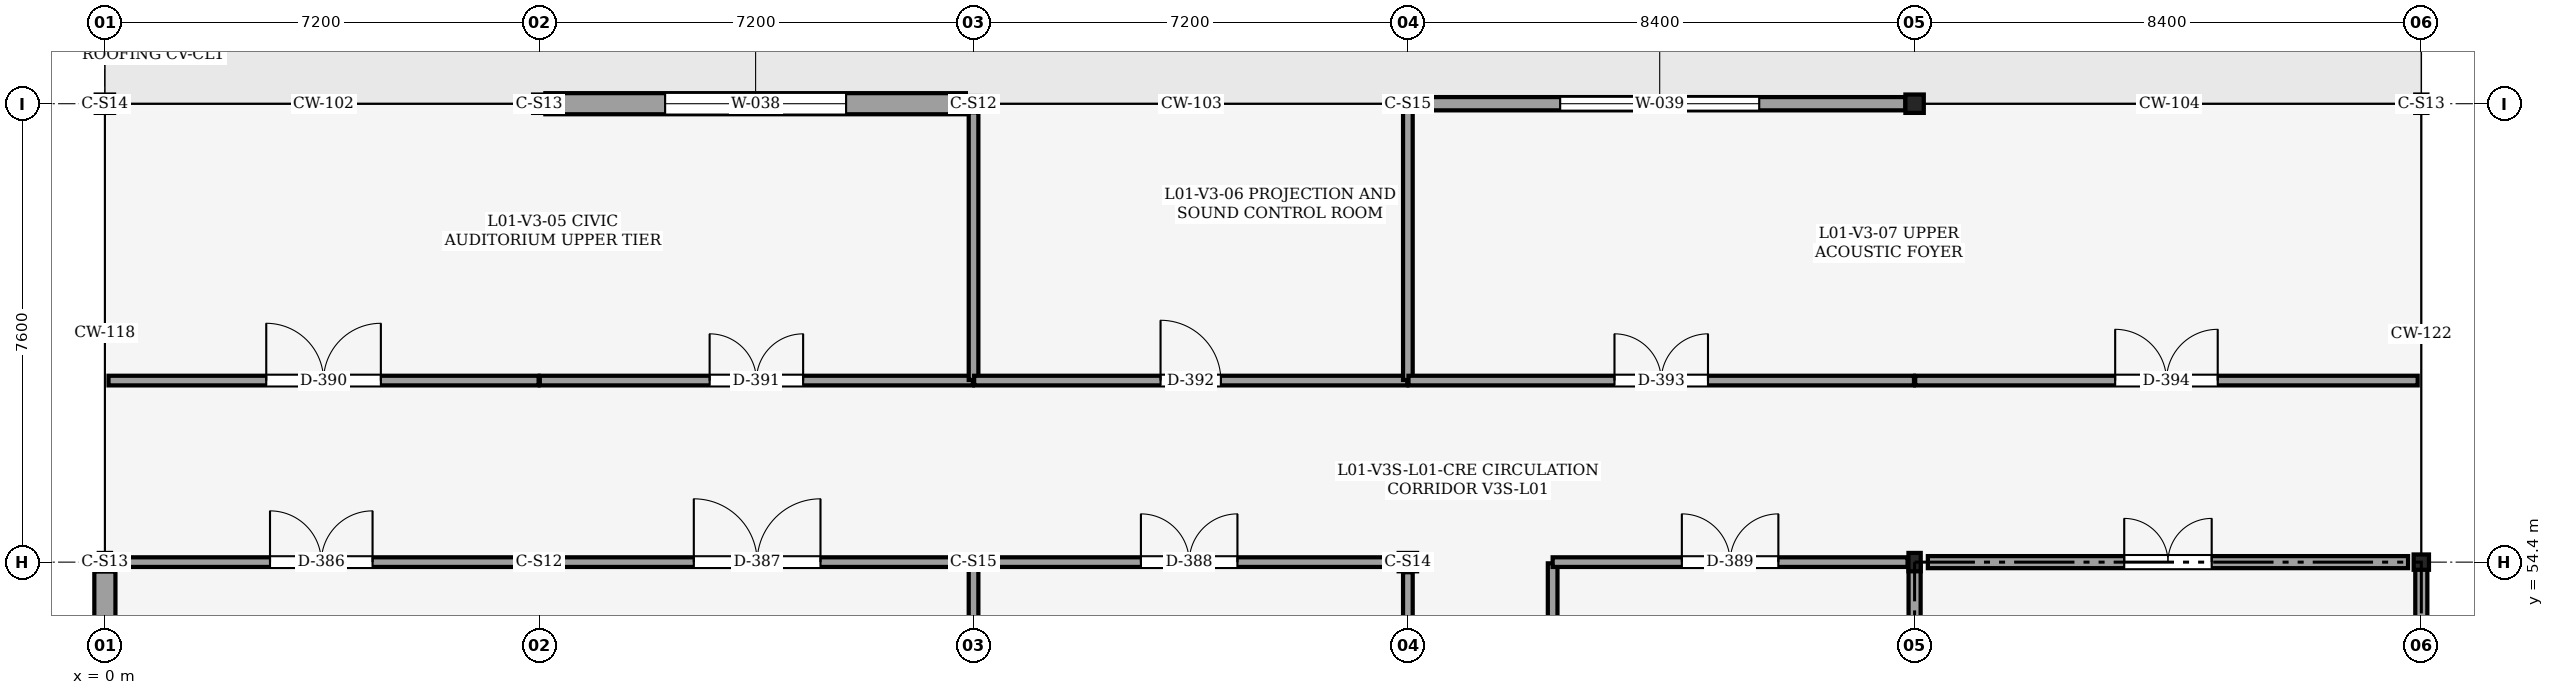
"""IFC4 building model, lengths in metres.
Left out: names, types, materials, properties, quantities, classifications, styles, units other than length and angle.
Written with IfcOpenShell. Run it as: python <this file> out.ifc"""

import sys

from ifc_helpers import new_model, si_unit, direction, frame, frame_2d, origin, origin_2d, place, context, subcontext, project, spatial, rectangle, hollow_rectangle, extrude, element, fill, save


model = new_model("IFC4")
c1 = context("Model", 3, precision=1e-05, world=origin(), true_north=direction((0.0, 1.0)))
c2 = subcontext(c1, "Body", "Model", "MODEL_VIEW")
j1 = project(units=[si_unit("LENGTHUNIT", "METRE"), si_unit("PLANEANGLEUNIT", "RADIAN")], contexts=[c1])
p1 = place(None, origin())
s1 = spatial("IfcSite", under=j1, at=p1, CompositionType="ELEMENT")
p2 = place(p1, origin())
s2 = spatial("IfcBuilding", under=s1, at=p2, CompositionType="ELEMENT")
p3 = place(p2, frame((0.0, 0.0, 5.4)))
s3 = spatial("IfcBuildingStorey", under=s2, at=p3, CompositionType="ELEMENT", Elevation=5.4)
p4 = place(p3, frame((0.0, 54.4, 0.0), z_axis=(0.0, 0.0, 1.0), x_axis=(1.0, 0.0, 0.0)))
e1 = element("IfcColumn", 1, at=p4, inside=s3, PredefinedType="COLUMN", context=c2, shape_type="SweptSolid", body=[
    extrude(hollow_rectangle(XDim=0.203, YDim=0.305, WallThickness=0.013, OuterFilletRadius=0.025, at=origin_2d()), origin(), (0.0, 0.0, 1.0), 4.8),
])
p5 = place(p3, frame((0.0, 62.0, 0.0), z_axis=(0.0, 0.0, 1.0), x_axis=(1.0, 0.0, 0.0)))
e2 = element("IfcColumn", 2, at=p5, inside=s3, PredefinedType="COLUMN", context=c2, shape_type="SweptSolid", body=[
    extrude(hollow_rectangle(XDim=0.305, YDim=0.305, WallThickness=0.016, OuterFilletRadius=0.032, at=origin_2d()), origin(), (0.0, 0.0, 1.0), 4.8),
])
p6 = place(p3, frame((7.2, 54.4, 0.0), z_axis=(0.0, 0.0, 1.0), x_axis=(1.0, 0.0, 0.0)))
e3 = element("IfcColumn", 3, at=p6, inside=s3, PredefinedType="COLUMN", context=c2, shape_type="SweptSolid", body=[
    extrude(hollow_rectangle(XDim=0.254, YDim=0.254, WallThickness=0.013, OuterFilletRadius=0.025, at=origin_2d()), origin(), (0.0, 0.0, 1.0), 4.8),
])
p7 = place(p3, frame((7.2, 62.0, 0.0), z_axis=(0.0, 0.0, 1.0), x_axis=(1.0, 0.0, 0.0)))
e4 = element("IfcColumn", 4, at=p7, inside=s3, PredefinedType="COLUMN", context=c2, shape_type="SweptSolid", body=[
    extrude(hollow_rectangle(XDim=0.203, YDim=0.305, WallThickness=0.013, OuterFilletRadius=0.025, at=origin_2d()), origin(), (0.0, 0.0, 1.0), 4.8),
])
p8 = place(p3, frame((14.4, 54.4, 0.0), z_axis=(0.0, 0.0, 1.0), x_axis=(1.0, 0.0, 0.0)))
e5 = element("IfcColumn", 5, at=p8, inside=s3, PredefinedType="COLUMN", context=c2, shape_type="SweptSolid", body=[
    extrude(hollow_rectangle(XDim=0.203, YDim=0.203, WallThickness=0.013, OuterFilletRadius=0.025, at=origin_2d()), origin(), (0.0, 0.0, 1.0), 4.8),
])
p9 = place(p3, frame((14.4, 62.0, 0.0), z_axis=(0.0, 0.0, 1.0), x_axis=(1.0, 0.0, 0.0)))
e6 = element("IfcColumn", 6, at=p9, inside=s3, PredefinedType="COLUMN", context=c2, shape_type="SweptSolid", body=[
    extrude(hollow_rectangle(XDim=0.254, YDim=0.254, WallThickness=0.013, OuterFilletRadius=0.025, at=origin_2d()), origin(), (0.0, 0.0, 1.0), 4.8),
])
p10 = place(p3, frame((21.6, 54.4, 0.0), z_axis=(0.0, 0.0, 1.0), x_axis=(1.0, 0.0, 0.0)))
e7 = element("IfcColumn", 7, at=p10, inside=s3, PredefinedType="COLUMN", context=c2, shape_type="SweptSolid", body=[
    extrude(hollow_rectangle(XDim=0.305, YDim=0.305, WallThickness=0.016, OuterFilletRadius=0.032, at=origin_2d()), origin(), (0.0, 0.0, 1.0), 4.8),
])
p11 = place(p3, frame((21.6, 62.0, 0.0), z_axis=(0.0, 0.0, 1.0), x_axis=(1.0, 0.0, 0.0)))
e8 = element("IfcColumn", 8, at=p11, inside=s3, PredefinedType="COLUMN", context=c2, shape_type="SweptSolid", body=[
    extrude(hollow_rectangle(XDim=0.203, YDim=0.203, WallThickness=0.013, OuterFilletRadius=0.025, at=origin_2d()), origin(), (0.0, 0.0, 1.0), 4.8),
])
p12 = place(p3, frame((30.0, 54.4, 0.0), z_axis=(0.0, 0.0, 1.0), x_axis=(1.0, 0.0, 0.0)))
e9 = element("IfcColumn", 9, at=p12, inside=s3, PredefinedType="COLUMN", context=c2, shape_type="SweptSolid", body=[
    extrude(hollow_rectangle(XDim=0.203, YDim=0.305, WallThickness=0.013, OuterFilletRadius=0.025, at=origin_2d()), origin(), (0.0, 0.0, 1.0), 4.8),
])
p13 = place(p3, frame((30.0, 62.0, 0.0), z_axis=(0.0, 0.0, 1.0), x_axis=(1.0, 0.0, 0.0)))
e10 = element("IfcColumn", 10, at=p13, inside=s3, PredefinedType="COLUMN", context=c2, shape_type="SweptSolid", body=[
    extrude(hollow_rectangle(XDim=0.305, YDim=0.305, WallThickness=0.016, OuterFilletRadius=0.032, at=origin_2d()), origin(), (0.0, 0.0, 1.0), 4.8),
])
p14 = place(p3, frame((38.4, 54.4, 0.0), z_axis=(0.0, 0.0, 1.0), x_axis=(1.0, 0.0, 0.0)))
e11 = element("IfcColumn", 11, at=p14, inside=s3, PredefinedType="COLUMN", context=c2, shape_type="SweptSolid", body=[
    extrude(hollow_rectangle(XDim=0.254, YDim=0.254, WallThickness=0.013, OuterFilletRadius=0.025, at=origin_2d()), origin(), (0.0, 0.0, 1.0), 4.8),
])
p15 = place(p3, frame((38.4, 62.0, 0.0), z_axis=(0.0, 0.0, 1.0), x_axis=(1.0, 0.0, 0.0)))
e12 = element("IfcColumn", 12, at=p15, inside=s3, PredefinedType="COLUMN", context=c2, shape_type="SweptSolid", body=[
    extrude(hollow_rectangle(XDim=0.203, YDim=0.305, WallThickness=0.013, OuterFilletRadius=0.025, at=origin_2d()), origin(), (0.0, 0.0, 1.0), 4.8),
])
p16 = place(p3, frame((7.302, 62.0, 0.0), z_axis=(0.0, 0.0, 1.0), x_axis=(1.0, 0.0, 0.0)))
e13 = element("IfcWall", 13, at=p16, inside=s3, PredefinedType="SOLIDWALL", context=c2, shape_type="SweptSolid", body=[
    extrude(rectangle(XDim=6.971, YDim=0.35, at=frame_2d((3.486, 0.0))), origin(), (0.0, 0.0, 1.0), 3.695),
])
p17 = place(p16, frame((1.986, 0.0, 0.9)))
e14 = element("IfcOpeningElement", 14, at=p17, cuts=e13, PredefinedType="OPENING", context=c2, shape_type="SweptSolid", body=[
    extrude(rectangle(XDim=3.0, YDim=1.75, at=frame_2d((1.5, 0.875))), frame((0.0, 0.185, 0.0), z_axis=(0.0, -1.0, 0.0), x_axis=(1.0, 0.0, 0.0)), (0.0, 0.0, 1.0), 0.371),
])
p18 = place(p3, frame((21.702, 62.0, 0.0), z_axis=(0.0, 0.0, 1.0), x_axis=(1.0, 0.0, 0.0)))
e15 = element("IfcWall", 15, at=p18, inside=s3, PredefinedType="SOLIDWALL", context=c2, shape_type="SweptSolid", body=[
    extrude(rectangle(XDim=8.146, YDim=0.22, at=frame_2d((4.073, 0.0))), origin(), (0.0, 0.0, 1.0), 3.695),
])
p19 = place(p18, frame((2.423, 0.0, 0.9)))
e16 = element("IfcOpeningElement", 16, at=p19, cuts=e15, PredefinedType="OPENING", context=c2, shape_type="SweptSolid", body=[
    extrude(rectangle(XDim=3.3, YDim=1.75, at=frame_2d((1.65, 0.875))), frame((0.0, 0.12, 0.0), z_axis=(0.0, -1.0, 0.0), x_axis=(1.0, 0.0, 0.0)), (0.0, 0.0, 1.0), 0.24),
])
p20 = place(p3, frame((0.0, 46.927, 0.0), z_axis=(0.0, 0.0, 1.0), x_axis=(0.0, 1.0, 0.0)))
e17 = element("IfcWall", 17, at=p20, inside=s3, PredefinedType="SOLIDWALL", context=c2, shape_type="SweptSolid", body=[
    extrude(rectangle(XDim=7.321, YDim=0.35, at=frame_2d((3.66, 0.0))), origin(), (0.0, 0.0, 1.0), 4.54),
])
p21 = place(p20, frame((0.75, 0.0, 0.9)))
e18 = element("IfcOpeningElement", 18, at=p21, cuts=e17, PredefinedType="OPENING", context=c2, shape_type="SweptSolid", body=[
    extrude(rectangle(XDim=1.2, YDim=1.5, at=frame_2d((0.6, 0.75))), frame((0.0, 0.185, 0.0), z_axis=(0.0, -1.0, 0.0), x_axis=(1.0, 0.0, 0.0)), (0.0, 0.0, 1.0), 0.371),
])
for number, where, z_axis, x_axis in (
    (19, (30.0, 51.12, 0.0), (0.0, 0.0, 1.0), (0.0, 1.0, 0.0)),
    (20, (38.4, 51.12, 0.0), (0.0, 0.0, 1.0), (0.0, 1.0, 0.0)),
):
    element("IfcWall", number, at=place(p3, frame(where, z_axis=z_axis, x_axis=x_axis)), inside=s3, PredefinedType="PARTITIONING", context=c2, shape_type="SweptSolid", body=[
        extrude(rectangle(XDim=3.26, YDim=0.2, at=frame_2d((1.63, 0.0))), origin(), (0.0, 0.0, 1.0), 4.54),
    ])
p22 = place(p3, frame((30.22, 54.4, 0.0), z_axis=(0.0, 0.0, 1.0), x_axis=(1.0, 0.0, 0.0)))
e21 = element("IfcWall", 21, at=p22, inside=s3, PredefinedType="PARTITIONING", context=c2, shape_type="SweptSolid", body=[
    extrude(rectangle(XDim=7.96, YDim=0.2, at=frame_2d((3.98, 0.0))), origin(), (0.0, 0.0, 1.0), 4.54),
])
p23 = place(p22, frame((3.255, 0.0, 0.0)))
e22 = element("IfcOpeningElement", 22, at=p23, cuts=e21, PredefinedType="OPENING", context=c2, shape_type="SweptSolid", body=[
    extrude(rectangle(XDim=1.45, YDim=2.2, at=frame_2d((0.725, 1.1))), frame((0.0, 0.11, 0.0), z_axis=(0.0, -1.0, 0.0), x_axis=(1.0, 0.0, 0.0)), (0.0, 0.0, 1.0), 0.22),
])
p24 = place(p3, frame((0.117, 54.4, 0.0), z_axis=(0.0, 0.0, 1.0), x_axis=(1.0, 0.0, 0.0)))
e23 = element("IfcWall", 23, at=p24, inside=s3, PredefinedType="PARTITIONING", context=c2, shape_type="SweptSolid", body=[
    extrude(rectangle(XDim=6.941, YDim=0.16, at=frame_2d((3.471, 0.0))), origin(), (0.0, 0.0, 1.0), 4.52),
])
p25 = place(p24, frame((2.621, 0.0, 0.0)))
e24 = element("IfcOpeningElement", 24, at=p25, cuts=e23, PredefinedType="OPENING", context=c2, shape_type="SweptSolid", body=[
    extrude(rectangle(XDim=1.7, YDim=2.4, at=frame_2d((0.85, 1.2))), frame((0.0, 0.09, 0.0), z_axis=(0.0, -1.0, 0.0), x_axis=(1.0, 0.0, 0.0)), (0.0, 0.0, 1.0), 0.18),
])
p26 = place(p3, frame((7.342, 54.4, 0.0), z_axis=(0.0, 0.0, 1.0), x_axis=(1.0, 0.0, 0.0)))
e25 = element("IfcWall", 25, at=p26, inside=s3, PredefinedType="PARTITIONING", context=c2, shape_type="SweptSolid", body=[
    extrude(rectangle(XDim=6.941, YDim=0.16, at=frame_2d((3.471, 0.0))), origin(), (0.0, 0.0, 1.0), 4.52),
])
p27 = place(p26, frame((2.421, 0.0, 0.0)))
e26 = element("IfcOpeningElement", 26, at=p27, cuts=e25, PredefinedType="OPENING", context=c2, shape_type="SweptSolid", body=[
    extrude(rectangle(XDim=2.1, YDim=2.5, at=frame_2d((1.05, 1.25))), frame((0.0, 0.09, 0.0), z_axis=(0.0, -1.0, 0.0), x_axis=(1.0, 0.0, 0.0)), (0.0, 0.0, 1.0), 0.18),
])
p28 = place(p3, frame((14.4, 46.967, 0.0), z_axis=(0.0, 0.0, 1.0), x_axis=(0.0, 1.0, 0.0)))
e27 = element("IfcWall", 27, at=p28, inside=s3, PredefinedType="PARTITIONING", context=c2, shape_type="SweptSolid", body=[
    extrude(rectangle(XDim=7.316, YDim=0.16, at=frame_2d((3.658, 0.0))), origin(), (0.0, 0.0, 1.0), 4.52),
])
p29 = place(p3, frame((14.517, 54.4, 0.0), z_axis=(0.0, 0.0, 1.0), x_axis=(1.0, 0.0, 0.0)))
e28 = element("IfcWall", 28, at=p29, inside=s3, PredefinedType="PARTITIONING", context=c2, shape_type="SweptSolid", body=[
    extrude(rectangle(XDim=6.916, YDim=0.16, at=frame_2d((3.458, 0.0))), origin(), (0.0, 0.0, 1.0), 4.52),
])
p30 = place(p29, frame((2.658, 0.0, 0.0)))
e29 = element("IfcOpeningElement", 29, at=p30, cuts=e28, PredefinedType="OPENING", context=c2, shape_type="SweptSolid", body=[
    extrude(rectangle(XDim=1.6, YDim=2.35, at=frame_2d((0.8, 1.175))), frame((0.0, 0.09, 0.0), z_axis=(0.0, -1.0, 0.0), x_axis=(1.0, 0.0, 0.0)), (0.0, 0.0, 1.0), 0.18),
])
p31 = place(p3, frame((21.6, 47.003, 0.0), z_axis=(0.0, 0.0, 1.0), x_axis=(0.0, 1.0, 0.0)))
e30 = element("IfcWall", 30, at=p31, inside=s3, PredefinedType="PARTITIONING", context=c2, shape_type="SweptSolid", body=[
    extrude(rectangle(XDim=7.23, YDim=0.16, at=frame_2d((3.615, 0.0))), origin(), (0.0, 0.0, 1.0), 4.52),
])
p32 = place(p3, frame((24.0, 46.84, 0.0), z_axis=(0.0, 0.0, 1.0), x_axis=(0.0, 1.0, 0.0)))
e31 = element("IfcWall", 31, at=p32, inside=s3, PredefinedType="PARTITIONING", context=c2, shape_type="SweptSolid", body=[
    extrude(rectangle(XDim=7.54, YDim=0.16, at=frame_2d((3.77, 0.0))), origin(), (0.0, 0.0, 1.0), 4.52),
])
p33 = place(p3, frame((24.0, 54.4, 0.0), z_axis=(0.0, 0.0, 1.0), x_axis=(1.0, 0.0, 0.0)))
e32 = element("IfcWall", 32, at=p33, inside=s3, PredefinedType="PARTITIONING", context=c2, shape_type="SweptSolid", body=[
    extrude(rectangle(XDim=5.883, YDim=0.16, at=frame_2d((2.942, 0.0))), origin(), (0.0, 0.0, 1.0), 4.52),
])
p34 = place(p33, frame((2.142, 0.0, 0.0)))
e33 = element("IfcOpeningElement", 33, at=p34, cuts=e32, PredefinedType="OPENING", context=c2, shape_type="SweptSolid", body=[
    extrude(rectangle(XDim=1.6, YDim=2.35, at=frame_2d((0.8, 1.175))), frame((0.0, 0.09, 0.0), z_axis=(0.0, -1.0, 0.0), x_axis=(1.0, 0.0, 0.0)), (0.0, 0.0, 1.0), 0.18),
])
p35 = place(p3, frame((0.06, 57.41, 0.0), z_axis=(0.0, 0.0, 1.0), x_axis=(1.0, 0.0, 0.0)))
e34 = element("IfcWall", 34, at=p35, inside=s3, PredefinedType="PARTITIONING", context=c2, shape_type="SweptSolid", body=[
    extrude(rectangle(XDim=7.13, YDim=0.16, at=frame_2d((3.565, 0.0))), origin(), (0.0, 0.0, 1.0), 4.52),
])
p36 = place(p35, frame((2.615, 0.0, 0.0)))
e35 = element("IfcOpeningElement", 35, at=p36, cuts=e34, PredefinedType="OPENING", context=c2, shape_type="SweptSolid", body=[
    extrude(rectangle(XDim=1.9, YDim=2.45, at=frame_2d((0.95, 1.225))), frame((0.0, 0.09, 0.0), z_axis=(0.0, -1.0, 0.0), x_axis=(1.0, 0.0, 0.0)), (0.0, 0.0, 1.0), 0.18),
])
p37 = place(p3, frame((7.21, 57.41, 0.0), z_axis=(0.0, 0.0, 1.0), x_axis=(1.0, 0.0, 0.0)))
e36 = element("IfcWall", 36, at=p37, inside=s3, PredefinedType="PARTITIONING", context=c2, shape_type="SweptSolid", body=[
    extrude(rectangle(XDim=7.18, YDim=0.16, at=frame_2d((3.59, 0.0))), origin(), (0.0, 0.0, 1.0), 4.52),
])
p38 = place(p37, frame((2.815, 0.0, 0.0)))
e37 = element("IfcOpeningElement", 37, at=p38, cuts=e36, PredefinedType="OPENING", context=c2, shape_type="SweptSolid", body=[
    extrude(rectangle(XDim=1.55, YDim=2.3, at=frame_2d((0.775, 1.15))), frame((0.0, 0.09, 0.0), z_axis=(0.0, -1.0, 0.0), x_axis=(1.0, 0.0, 0.0)), (0.0, 0.0, 1.0), 0.18),
])
p39 = place(p3, frame((14.4, 57.42, 0.0), z_axis=(0.0, 0.0, 1.0), x_axis=(0.0, 1.0, 0.0)))
e38 = element("IfcWall", 38, at=p39, inside=s3, PredefinedType="PARTITIONING", context=c2, shape_type="SweptSolid", body=[
    extrude(rectangle(XDim=4.438, YDim=0.16, at=frame_2d((2.219, 0.0))), origin(), (0.0, 0.0, 1.0), 4.52),
])
p40 = place(p3, frame((14.41, 57.41, 0.0), z_axis=(0.0, 0.0, 1.0), x_axis=(1.0, 0.0, 0.0)))
e39 = element("IfcWall", 39, at=p40, inside=s3, PredefinedType="PARTITIONING", context=c2, shape_type="SweptSolid", body=[
    extrude(rectangle(XDim=7.18, YDim=0.16, at=frame_2d((3.59, 0.0))), origin(), (0.0, 0.0, 1.0), 4.52),
])
p41 = place(p40, frame((3.09, 0.0, 0.0)))
e40 = element("IfcOpeningElement", 40, at=p41, cuts=e39, PredefinedType="OPENING", context=c2, shape_type="SweptSolid", body=[
    extrude(rectangle(XDim=1.0, YDim=2.15, at=frame_2d((0.5, 1.075))), frame((0.0, 0.09, 0.0), z_axis=(0.0, -1.0, 0.0), x_axis=(1.0, 0.0, 0.0)), (0.0, 0.0, 1.0), 0.18),
])
p42 = place(p3, frame((21.6, 57.42, 0.0), z_axis=(0.0, 0.0, 1.0), x_axis=(0.0, 1.0, 0.0)))
e41 = element("IfcWall", 41, at=p42, inside=s3, PredefinedType="PARTITIONING", context=c2, shape_type="SweptSolid", body=[
    extrude(rectangle(XDim=4.463, YDim=0.16, at=frame_2d((2.232, 0.0))), origin(), (0.0, 0.0, 1.0), 4.52),
])
p43 = place(p3, frame((21.61, 57.41, 0.0), z_axis=(0.0, 0.0, 1.0), x_axis=(1.0, 0.0, 0.0)))
e42 = element("IfcWall", 42, at=p43, inside=s3, PredefinedType="PARTITIONING", context=c2, shape_type="SweptSolid", body=[
    extrude(rectangle(XDim=8.38, YDim=0.16, at=frame_2d((4.19, 0.0))), origin(), (0.0, 0.0, 1.0), 4.52),
])
p44 = place(p43, frame((3.415, 0.0, 0.0)))
e43 = element("IfcOpeningElement", 43, at=p44, cuts=e42, PredefinedType="OPENING", context=c2, shape_type="SweptSolid", body=[
    extrude(rectangle(XDim=1.55, YDim=2.3, at=frame_2d((0.775, 1.15))), frame((0.0, 0.09, 0.0), z_axis=(0.0, -1.0, 0.0), x_axis=(1.0, 0.0, 0.0)), (0.0, 0.0, 1.0), 0.18),
])
p45 = place(p3, frame((30.01, 57.41, 0.0), z_axis=(0.0, 0.0, 1.0), x_axis=(1.0, 0.0, 0.0)))
e44 = element("IfcWall", 44, at=p45, inside=s3, PredefinedType="PARTITIONING", context=c2, shape_type="SweptSolid", body=[
    extrude(rectangle(XDim=8.33, YDim=0.16, at=frame_2d((4.165, 0.0))), origin(), (0.0, 0.0, 1.0), 4.52),
])
p46 = place(p45, frame((3.315, 0.0, 0.0)))
e45 = element("IfcOpeningElement", 45, at=p46, cuts=e44, PredefinedType="OPENING", context=c2, shape_type="SweptSolid", body=[
    extrude(rectangle(XDim=1.7, YDim=2.4, at=frame_2d((0.85, 1.2))), frame((0.0, 0.09, 0.0), z_axis=(0.0, -1.0, 0.0), x_axis=(1.0, 0.0, 0.0)), (0.0, 0.0, 1.0), 0.18),
])
p47 = place(p17, origin())
e46 = element("IfcWindow", 46, at=p47, inside=s3, PartitioningType="SINGLE_PANEL", PredefinedType="WINDOW", context=c2, shape_type="SweptSolid", body=[
    extrude(rectangle(XDim=3.0, YDim=1.75, at=frame_2d((1.5, 0.875))), frame((0.0, 0.03, 0.0), z_axis=(0.0, -1.0, 0.0), x_axis=(1.0, 0.0, 0.0)), (0.0, 0.0, 1.0), 0.06),
])
fill(e14, e46)
p48 = place(p19, origin())
e47 = element("IfcWindow", 47, at=p48, inside=s3, PartitioningType="SINGLE_PANEL", PredefinedType="WINDOW", context=c2, shape_type="SweptSolid", body=[
    extrude(rectangle(XDim=3.3, YDim=1.75, at=frame_2d((1.65, 0.875))), frame((0.0, 0.03, 0.0), z_axis=(0.0, -1.0, 0.0), x_axis=(1.0, 0.0, 0.0)), (0.0, 0.0, 1.0), 0.06),
])
fill(e16, e47)
p49 = place(p23, origin())
e48 = element("IfcDoor", 48, at=p49, inside=s3, OperationType="DOUBLE_DOOR_SINGLE_SWING", PredefinedType="DOOR", context=c2, shape_type="SweptSolid", body=[
    extrude(rectangle(XDim=1.45, YDim=2.2, at=frame_2d((0.725, 1.1))), frame((0.0, 0.025, 0.0), z_axis=(0.0, -1.0, 0.0), x_axis=(1.0, 0.0, 0.0)), (0.0, 0.0, 1.0), 0.05),
])
fill(e22, e48)
p50 = place(p25, origin())
e49 = element("IfcDoor", 49, at=p50, inside=s3, OperationType="DOUBLE_DOOR_SINGLE_SWING", PredefinedType="DOOR", context=c2, shape_type="SweptSolid", body=[
    extrude(rectangle(XDim=1.7, YDim=2.4, at=frame_2d((0.85, 1.2))), frame((0.0, 0.025, 0.0), z_axis=(0.0, -1.0, 0.0), x_axis=(1.0, 0.0, 0.0)), (0.0, 0.0, 1.0), 0.05),
])
fill(e24, e49)
p51 = place(p27, origin())
e50 = element("IfcDoor", 50, at=p51, inside=s3, OperationType="DOUBLE_DOOR_SINGLE_SWING", PredefinedType="DOOR", context=c2, shape_type="SweptSolid", body=[
    extrude(rectangle(XDim=2.1, YDim=2.5, at=frame_2d((1.05, 1.25))), frame((0.0, 0.025, 0.0), z_axis=(0.0, -1.0, 0.0), x_axis=(1.0, 0.0, 0.0)), (0.0, 0.0, 1.0), 0.05),
])
fill(e26, e50)
p52 = place(p30, origin())
e51 = element("IfcDoor", 51, at=p52, inside=s3, OperationType="DOUBLE_DOOR_SINGLE_SWING", PredefinedType="DOOR", context=c2, shape_type="SweptSolid", body=[
    extrude(rectangle(XDim=1.6, YDim=2.35, at=frame_2d((0.8, 1.175))), frame((0.0, 0.025, 0.0), z_axis=(0.0, -1.0, 0.0), x_axis=(1.0, 0.0, 0.0)), (0.0, 0.0, 1.0), 0.05),
])
fill(e29, e51)
p53 = place(p34, origin())
e52 = element("IfcDoor", 52, at=p53, inside=s3, OperationType="DOUBLE_DOOR_SINGLE_SWING", PredefinedType="DOOR", context=c2, shape_type="SweptSolid", body=[
    extrude(rectangle(XDim=1.6, YDim=2.35, at=frame_2d((0.8, 1.175))), frame((0.0, 0.025, 0.0), z_axis=(0.0, -1.0, 0.0), x_axis=(1.0, 0.0, 0.0)), (0.0, 0.0, 1.0), 0.05),
])
fill(e33, e52)
p54 = place(p36, origin())
e53 = element("IfcDoor", 53, at=p54, inside=s3, OperationType="DOUBLE_DOOR_SINGLE_SWING", PredefinedType="DOOR", context=c2, shape_type="SweptSolid", body=[
    extrude(rectangle(XDim=1.9, YDim=2.45, at=frame_2d((0.95, 1.225))), frame((0.0, 0.025, 0.0), z_axis=(0.0, -1.0, 0.0), x_axis=(1.0, 0.0, 0.0)), (0.0, 0.0, 1.0), 0.05),
])
fill(e35, e53)
p55 = place(p38, origin())
e54 = element("IfcDoor", 54, at=p55, inside=s3, OperationType="DOUBLE_DOOR_SINGLE_SWING", PredefinedType="DOOR", context=c2, shape_type="SweptSolid", body=[
    extrude(rectangle(XDim=1.55, YDim=2.3, at=frame_2d((0.775, 1.15))), frame((0.0, 0.025, 0.0), z_axis=(0.0, -1.0, 0.0), x_axis=(1.0, 0.0, 0.0)), (0.0, 0.0, 1.0), 0.05),
])
fill(e37, e54)
p56 = place(p41, origin())
e55 = element("IfcDoor", 55, at=p56, inside=s3, OperationType="SINGLE_SWING_LEFT", PredefinedType="DOOR", context=c2, shape_type="SweptSolid", body=[
    extrude(rectangle(XDim=1.0, YDim=2.15, at=frame_2d((0.5, 1.075))), frame((0.0, 0.025, 0.0), z_axis=(0.0, -1.0, 0.0), x_axis=(1.0, 0.0, 0.0)), (0.0, 0.0, 1.0), 0.05),
])
fill(e40, e55)
p57 = place(p44, origin())
e56 = element("IfcDoor", 56, at=p57, inside=s3, OperationType="DOUBLE_DOOR_SINGLE_SWING", PredefinedType="DOOR", context=c2, shape_type="SweptSolid", body=[
    extrude(rectangle(XDim=1.55, YDim=2.3, at=frame_2d((0.775, 1.15))), frame((0.0, 0.025, 0.0), z_axis=(0.0, -1.0, 0.0), x_axis=(1.0, 0.0, 0.0)), (0.0, 0.0, 1.0), 0.05),
])
fill(e43, e56)
p58 = place(p46, origin())
e57 = element("IfcDoor", 57, at=p58, inside=s3, OperationType="DOUBLE_DOOR_SINGLE_SWING", PredefinedType="DOOR", context=c2, shape_type="SweptSolid", body=[
    extrude(rectangle(XDim=1.7, YDim=2.4, at=frame_2d((0.85, 1.2))), frame((0.0, 0.025, 0.0), z_axis=(0.0, -1.0, 0.0), x_axis=(1.0, 0.0, 0.0)), (0.0, 0.0, 1.0), 0.05),
])
fill(e45, e57)
save(model, sys.argv[1])
